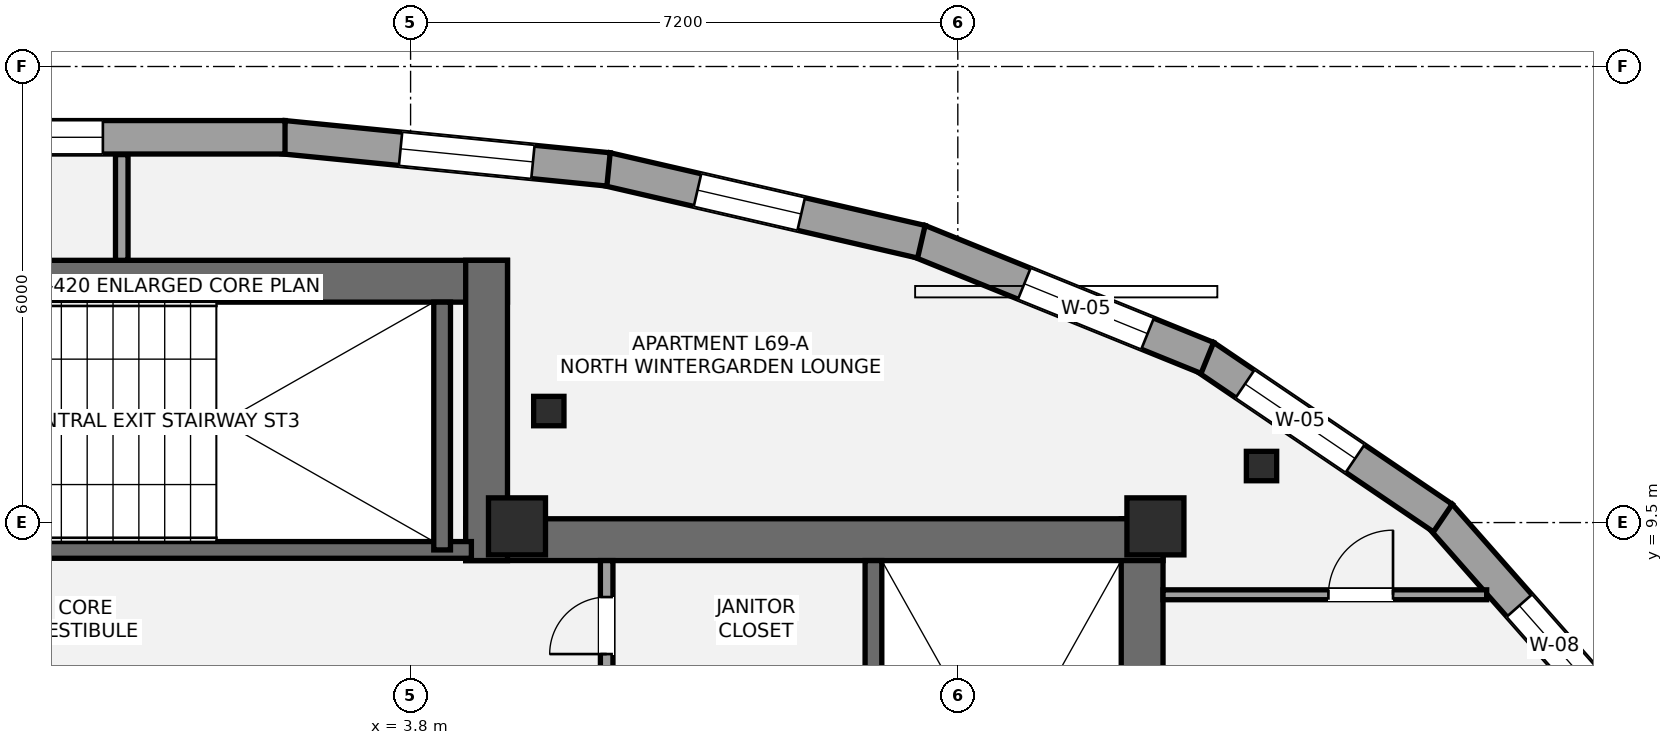
"""IFC4 building model, lengths in metres.
Left out: names, types, materials, properties, quantities, classifications, styles, units other than length and angle.
Written with IfcOpenShell. Run it as: python <this file> out.ifc"""

import sys

from ifc_helpers import new_model, si_unit, direction, frame, frame_2d, origin, origin_2d, place, context, subcontext, project, spatial, rectangle, i_section, extrude, element, fill, save


model = new_model("IFC4")
c1 = context("Model", 3, precision=1e-05, world=origin(), true_north=direction((0.0, 1.0)))
c2 = subcontext(c1, "Body", "Model", "MODEL_VIEW")
j1 = project(units=[si_unit("LENGTHUNIT", "METRE"), si_unit("PLANEANGLEUNIT", "RADIAN")], contexts=[c1])
p1 = place(None, origin())
s1 = spatial("IfcSite", under=j1, at=p1, CompositionType="ELEMENT")
p2 = place(p1, origin())
s2 = spatial("IfcBuilding", under=s1, at=p2, CompositionType="ELEMENT")
p3 = place(p2, frame((0.0, 0.0, 244.65)))
s3 = spatial("IfcBuildingStorey", under=s2, at=p3, CompositionType="ELEMENT", Elevation=244.65)
p4 = place(p3, frame((13.425, 1.3, 0.0), z_axis=(0.0, 0.0, 1.0), x_axis=(0.0, 1.0, 0.0)))
e1 = element("IfcWall", 1, at=p4, inside=s3, PredefinedType="SHEAR", context=c2, shape_type="SweptSolid", body=[
    extrude(rectangle(XDim=8.25, YDim=0.55, at=frame_2d((4.125, 0.0))), origin(), (0.0, 0.0, 1.0), 3.15),
])
p5 = place(p3, frame((4.525, 9.275, 0.0), z_axis=(0.0, 0.0, 1.0), x_axis=(1.0, 0.0, 0.0)))
e2 = element("IfcWall", 2, at=p5, inside=s3, PredefinedType="SHEAR", context=c2, shape_type="SweptSolid", body=[
    extrude(rectangle(XDim=9.175, YDim=0.55, at=frame_2d((4.587, 0.0))), origin(), (0.0, 0.0, 1.0), 3.15),
])
p6 = place(p3, frame((9.89, 1.85, 0.0), z_axis=(0.0, 0.0, 1.0), x_axis=(0.0, 1.0, 0.0)))
e3 = element("IfcWall", 3, at=p6, inside=s3, PredefinedType="SHEAR", context=c2, shape_type="SweptSolid", body=[
    extrude(rectangle(XDim=7.15, YDim=0.22, at=frame_2d((3.575, 0.0))), origin(), (0.0, 0.0, 1.0), 3.15),
])
p7 = place(p3, frame((-5.075, 12.675, 0.0), z_axis=(0.0, 0.0, 1.0), x_axis=(1.0, 0.0, 0.0)))
e4 = element("IfcWall", 4, at=p7, inside=s3, PredefinedType="SHEAR", context=c2, shape_type="SweptSolid", body=[
    extrude(rectangle(XDim=10.15, YDim=0.55, at=frame_2d((5.075, 0.0))), origin(), (0.0, 0.0, 1.0), 3.15),
])
p8 = place(p3, frame((4.8, 9.0, 0.0), z_axis=(0.0, 0.0, 1.0), x_axis=(0.0, 1.0, 0.0)))
e5 = element("IfcWall", 5, at=p8, inside=s3, PredefinedType="SHEAR", context=c2, shape_type="SweptSolid", body=[
    extrude(rectangle(XDim=3.95, YDim=0.55, at=frame_2d((1.975, 0.0))), origin(), (0.0, 0.0, 1.0), 3.15),
])
p9 = place(p3, frame((-4.7, 9.14, 0.0), z_axis=(0.0, 0.0, 1.0), x_axis=(1.0, 0.0, 0.0)))
e6 = element("IfcWall", 6, at=p9, inside=s3, PredefinedType="SHEAR", context=c2, shape_type="SweptSolid", body=[
    extrude(rectangle(XDim=9.3, YDim=0.22, at=frame_2d((4.65, 0.0))), origin(), (0.0, 0.0, 1.0), 3.15),
])
p10 = place(p9, frame((1.15, 0.0, 0.0)))
e7 = element("IfcOpeningElement", 7, at=p10, cuts=e6, PredefinedType="OPENING", context=c2, shape_type="SweptSolid", body=[
    extrude(rectangle(XDim=1.05, YDim=2.15, at=frame_2d((0.525, 1.075))), frame((0.0, 0.12, 0.0), z_axis=(0.0, -1.0, 0.0), x_axis=(1.0, 0.0, 0.0)), (0.0, 0.0, 1.0), 0.24),
])
p11 = place(p3, frame((4.215, 9.14, 0.0), z_axis=(0.0, 0.0, 1.0), x_axis=(0.0, 1.0, 0.0)))
e8 = element("IfcWall", 8, at=p11, inside=s3, PredefinedType="SHEAR", context=c2, shape_type="SweptSolid", body=[
    extrude(rectangle(XDim=3.26, YDim=0.22, at=frame_2d((1.63, 0.0))), origin(), (0.0, 0.0, 1.0), 3.15),
])
for number, where, z_axis, x_axis in (
    (9, (5.2, 9.45, 0.0), (0.0, 0.0, 1.0), (1.0, 0.0, 0.0)),
    (10, (13.6, 9.45, 0.0), (0.0, 0.0, 1.0), (1.0, 0.0, 0.0)),
):
    element("IfcColumn", number, at=place(p3, frame(where, z_axis=z_axis, x_axis=x_axis)), inside=s3, PredefinedType="PILASTER", context=c2, shape_type="SweptSolid", body=[
        extrude(rectangle(XDim=0.75, YDim=0.75, at=origin_2d()), origin(), (0.0, 0.0, 1.0), 3.15),
    ])
for number, where, z_axis, x_axis in (
    (11, (14.996, 10.244, 0.0), (0.0, 0.0, 1.0), (1.0, 0.0, 0.0)),
    (12, (5.619, 10.967, 0.0), (0.0, 0.0, 1.0), (1.0, 0.0, 0.0)),
):
    element("IfcColumn", number, at=place(p3, frame(where, z_axis=z_axis, x_axis=x_axis)), inside=s3, PredefinedType="COLUMN", context=c2, shape_type="SweptSolid", body=[
        extrude(i_section(OverallWidth=0.399, OverallDepth=0.387, WebThickness=0.021, FlangeThickness=0.033, at=origin_2d()), origin(), (0.0, 0.0, 1.0), 3.15),
    ])
p12 = place(p3, frame((17.34, 9.596, 0.0), z_axis=(0.0, 0.0, 1.0), x_axis=(0.66136043846, -0.750068243855, 0.0)))
e13 = element("IfcWall", 13, at=p12, inside=s3, PredefinedType="STANDARD", context=c2, shape_type="SweptSolid", body=[
    extrude(rectangle(XDim=3.432, YDim=0.44, at=frame_2d((1.716, 0.0))), origin(), (0.0, 0.0, 1.0), 2.336),
])
p13 = place(p12, frame((1.585, 0.0, 0.58)))
e14 = element("IfcOpeningElement", 14, at=p13, cuts=e13, PredefinedType="OPENING", context=c2, shape_type="SweptSolid", body=[
    extrude(rectangle(XDim=1.4, YDim=1.55, at=frame_2d((0.7, 0.775))), frame((0.0, 0.23, 0.0), z_axis=(0.0, -1.0, 0.0), x_axis=(1.0, 0.0, 0.0)), (0.0, 0.0, 1.0), 0.46),
])
p14 = place(p3, frame((14.242, 11.688, 0.0), z_axis=(0.0, 0.0, 1.0), x_axis=(0.827637036896, -0.561263694851, 0.0)))
e15 = element("IfcWall", 15, at=p14, inside=s3, PredefinedType="STANDARD", context=c2, shape_type="SweptSolid", body=[
    extrude(rectangle(XDim=3.793, YDim=0.44, at=frame_2d((1.896, 0.0))), origin(), (0.0, 0.0, 1.0), 2.336),
])
p15 = place(p14, frame((0.648, 0.0, 0.55)))
e16 = element("IfcOpeningElement", 16, at=p15, cuts=e15, PredefinedType="OPENING", context=c2, shape_type="SweptSolid", body=[
    extrude(rectangle(XDim=1.75, YDim=1.55, at=frame_2d((0.875, 0.775))), frame((0.0, 0.23, 0.0), z_axis=(0.0, -1.0, 0.0), x_axis=(1.0, 0.0, 0.0)), (0.0, 0.0, 1.0), 0.46),
])
p16 = place(p3, frame((10.487, 13.205, 0.0), z_axis=(0.0, 0.0, 1.0), x_axis=(0.926731976866, -0.375723093586, 0.0)))
e17 = element("IfcWall", 17, at=p16, inside=s3, PredefinedType="STANDARD", context=c2, shape_type="SweptSolid", body=[
    extrude(rectangle(XDim=4.096, YDim=0.44, at=frame_2d((2.048, 0.0))), origin(), (0.0, 0.0, 1.0), 2.336),
])
p17 = place(p16, frame((1.498, 0.0, 0.55)))
e18 = element("IfcOpeningElement", 18, at=p17, cuts=e17, PredefinedType="OPENING", context=c2, shape_type="SweptSolid", body=[
    extrude(rectangle(XDim=1.75, YDim=1.55, at=frame_2d((0.875, 0.775))), frame((0.0, 0.23, 0.0), z_axis=(0.0, -1.0, 0.0), x_axis=(1.0, 0.0, 0.0)), (0.0, 0.0, 1.0), 0.46),
])
p18 = place(p3, frame((6.377, 14.151, 0.0), z_axis=(0.0, 0.0, 1.0), x_axis=(0.974398936081, -0.224825962391, 0.0)))
e19 = element("IfcWall", 19, at=p18, inside=s3, PredefinedType="STANDARD", context=c2, shape_type="SweptSolid", body=[
    extrude(rectangle(XDim=4.252, YDim=0.44, at=frame_2d((2.126, 0.0))), origin(), (0.0, 0.0, 1.0), 2.336),
])
p19 = place(p18, frame((1.23, 0.0, 0.55)))
e20 = element("IfcOpeningElement", 20, at=p19, cuts=e19, PredefinedType="OPENING", context=c2, shape_type="SweptSolid", body=[
    extrude(rectangle(XDim=1.4, YDim=1.55, at=frame_2d((0.7, 0.775))), frame((0.0, 0.23, 0.0), z_axis=(0.0, -1.0, 0.0), x_axis=(1.0, 0.0, 0.0)), (0.0, 0.0, 1.0), 0.46),
])
p20 = place(p3, frame((2.126, 14.57, 0.0), z_axis=(0.0, 0.0, 1.0), x_axis=(0.995134540264, -0.098525361068, 0.0)))
e21 = element("IfcWall", 21, at=p20, inside=s3, PredefinedType="STANDARD", context=c2, shape_type="SweptSolid", body=[
    extrude(rectangle(XDim=4.299, YDim=0.44, at=frame_2d((2.15, 0.0))), origin(), (0.0, 0.0, 1.0), 2.336),
])
p21 = place(p20, frame((1.55, 0.0, 0.55)))
e22 = element("IfcOpeningElement", 22, at=p21, cuts=e21, PredefinedType="OPENING", context=c2, shape_type="SweptSolid", body=[
    extrude(rectangle(XDim=1.75, YDim=1.55, at=frame_2d((0.875, 0.775))), frame((0.0, 0.23, 0.0), z_axis=(0.0, -1.0, 0.0), x_axis=(1.0, 0.0, 0.0)), (0.0, 0.0, 1.0), 0.46),
])
p22 = place(p3, frame((-2.148, 14.569, 0.0), z_axis=(0.0, 0.0, 1.0), x_axis=(1.0, 0.0, 0.0)))
e23 = element("IfcWall", 23, at=p22, inside=s3, PredefinedType="STANDARD", context=c2, shape_type="SweptSolid", body=[
    extrude(rectangle(XDim=4.296, YDim=0.44, at=frame_2d((2.148, 0.0))), origin(), (0.0, 0.0, 1.0), 2.336),
])
p23 = place(p22, frame((0.5, 0.0, 0.58)))
e24 = element("IfcOpeningElement", 24, at=p23, cuts=e23, PredefinedType="OPENING", context=c2, shape_type="SweptSolid", body=[
    extrude(rectangle(XDim=1.4, YDim=1.55, at=frame_2d((0.7, 0.775))), frame((0.0, 0.23, 0.0), z_axis=(0.0, -1.0, 0.0), x_axis=(1.0, 0.0, 0.0)), (0.0, 0.0, 1.0), 0.46),
])
p24 = place(p3, frame((6.38, 7.42, 0.0), z_axis=(0.0, 0.0, 1.0), x_axis=(0.0, 1.0, 0.0)))
e25 = element("IfcWall", 25, at=p24, inside=s3, PredefinedType="PARTITIONING", context=c2, shape_type="SweptSolid", body=[
    extrude(rectangle(XDim=1.58, YDim=0.165, at=frame_2d((0.79, 0.0))), origin(), (0.0, 0.0, 1.0), 2.97),
])
p25 = place(p24, frame((0.35, 0.0, 0.0)))
e26 = element("IfcOpeningElement", 26, at=p25, cuts=e25, PredefinedType="OPENING", context=c2, shape_type="SweptSolid", body=[
    extrude(rectangle(XDim=0.75, YDim=2.1, at=frame_2d((0.375, 1.05))), frame((0.0, 0.093, 0.0), z_axis=(0.0, -1.0, 0.0), x_axis=(1.0, 0.0, 0.0)), (0.0, 0.0, 1.0), 0.185),
])
p26 = place(p3, frame((0.0, 12.95, 0.0), z_axis=(0.0, 0.0, 1.0), x_axis=(0.0, 1.0, 0.0)))
e27 = element("IfcWall", 27, at=p26, inside=s3, PredefinedType="PARTITIONING", context=c2, shape_type="SweptSolid", body=[
    extrude(rectangle(XDim=1.391, YDim=0.165, at=frame_2d((0.695, 0.0))), origin(), (0.0, 0.0, 1.0), 2.97),
])
p27 = place(p3, frame((13.7, 8.55, 0.0), z_axis=(0.0, 0.0, 1.0), x_axis=(1.0, 0.0, 0.0)))
e28 = element("IfcWall", 28, at=p27, inside=s3, PredefinedType="PARTITIONING", context=c2, shape_type="SweptSolid", body=[
    extrude(rectangle(XDim=4.258, YDim=0.13, at=frame_2d((2.129, 0.0))), origin(), (0.0, 0.0, 1.0), 2.423),
])
p28 = place(p27, frame((2.176, 0.0, 0.0)))
e29 = element("IfcOpeningElement", 29, at=p28, cuts=e28, PredefinedType="OPENING", context=c2, shape_type="SweptSolid", body=[
    extrude(rectangle(XDim=0.85, YDim=2.1, at=frame_2d((0.425, 1.05))), frame((0.0, 0.075, 0.0), z_axis=(0.0, -1.0, 0.0), x_axis=(1.0, 0.0, 0.0)), (0.0, 0.0, 1.0), 0.15),
])
p29 = place(p13, origin())
e30 = element("IfcWindow", 30, at=p29, inside=s3, PartitioningType="SINGLE_PANEL", PredefinedType="WINDOW", context=c2, shape_type="SweptSolid", body=[
    extrude(rectangle(XDim=1.4, YDim=1.55, at=frame_2d((0.7, 0.775))), frame((0.0, -0.01, 0.0), z_axis=(0.0, -1.0, 0.0), x_axis=(1.0, 0.0, 0.0)), (0.0, 0.0, 1.0), 0.06),
])
fill(e14, e30)
p30 = place(p15, origin())
e31 = element("IfcWindow", 31, at=p30, inside=s3, PartitioningType="SINGLE_PANEL", PredefinedType="WINDOW", context=c2, shape_type="SweptSolid", body=[
    extrude(rectangle(XDim=1.75, YDim=1.55, at=frame_2d((0.875, 0.775))), frame((0.0, -0.01, 0.0), z_axis=(0.0, -1.0, 0.0), x_axis=(1.0, 0.0, 0.0)), (0.0, 0.0, 1.0), 0.06),
])
fill(e16, e31)
p31 = place(p17, origin())
e32 = element("IfcWindow", 32, at=p31, inside=s3, PartitioningType="SINGLE_PANEL", PredefinedType="WINDOW", context=c2, shape_type="SweptSolid", body=[
    extrude(rectangle(XDim=1.75, YDim=1.55, at=frame_2d((0.875, 0.775))), frame((0.0, -0.01, 0.0), z_axis=(0.0, -1.0, 0.0), x_axis=(1.0, 0.0, 0.0)), (0.0, 0.0, 1.0), 0.06),
])
fill(e18, e32)
p32 = place(p19, origin())
e33 = element("IfcWindow", 33, at=p32, inside=s3, PartitioningType="SINGLE_PANEL", PredefinedType="WINDOW", context=c2, shape_type="SweptSolid", body=[
    extrude(rectangle(XDim=1.4, YDim=1.55, at=frame_2d((0.7, 0.775))), frame((0.0, -0.01, 0.0), z_axis=(0.0, -1.0, 0.0), x_axis=(1.0, 0.0, 0.0)), (0.0, 0.0, 1.0), 0.06),
])
fill(e20, e33)
p33 = place(p21, origin())
e34 = element("IfcWindow", 34, at=p33, inside=s3, PartitioningType="SINGLE_PANEL", PredefinedType="WINDOW", context=c2, shape_type="SweptSolid", body=[
    extrude(rectangle(XDim=1.75, YDim=1.55, at=frame_2d((0.875, 0.775))), frame((0.0, -0.01, 0.0), z_axis=(0.0, -1.0, 0.0), x_axis=(1.0, 0.0, 0.0)), (0.0, 0.0, 1.0), 0.06),
])
fill(e22, e34)
p34 = place(p23, origin())
e35 = element("IfcWindow", 35, at=p34, inside=s3, PartitioningType="SINGLE_PANEL", PredefinedType="WINDOW", context=c2, shape_type="SweptSolid", body=[
    extrude(rectangle(XDim=1.4, YDim=1.55, at=frame_2d((0.7, 0.775))), frame((0.0, -0.01, 0.0), z_axis=(0.0, -1.0, 0.0), x_axis=(1.0, 0.0, 0.0)), (0.0, 0.0, 1.0), 0.06),
])
fill(e24, e35)
p35 = place(p25, origin())
e36 = element("IfcDoor", 36, at=p35, inside=s3, OperationType="SINGLE_SWING_LEFT", PredefinedType="DOOR", context=c2, shape_type="SweptSolid", body=[
    extrude(rectangle(XDim=0.75, YDim=2.1, at=frame_2d((0.375, 1.05))), frame((0.0, 0.025, 0.0), z_axis=(0.0, -1.0, 0.0), x_axis=(1.0, 0.0, 0.0)), (0.0, 0.0, 1.0), 0.05),
])
fill(e26, e36)
p36 = place(p28, origin())
e37 = element("IfcDoor", 37, at=p36, inside=s3, OperationType="SINGLE_SWING_RIGHT", PredefinedType="DOOR", context=c2, shape_type="SweptSolid", body=[
    extrude(rectangle(XDim=0.85, YDim=2.1, at=frame_2d((0.425, 1.05))), frame((0.0, 0.025, 0.0), z_axis=(0.0, -1.0, 0.0), x_axis=(1.0, 0.0, 0.0)), (0.0, 0.0, 1.0), 0.05),
])
fill(e29, e37)
save(model, sys.argv[1])
